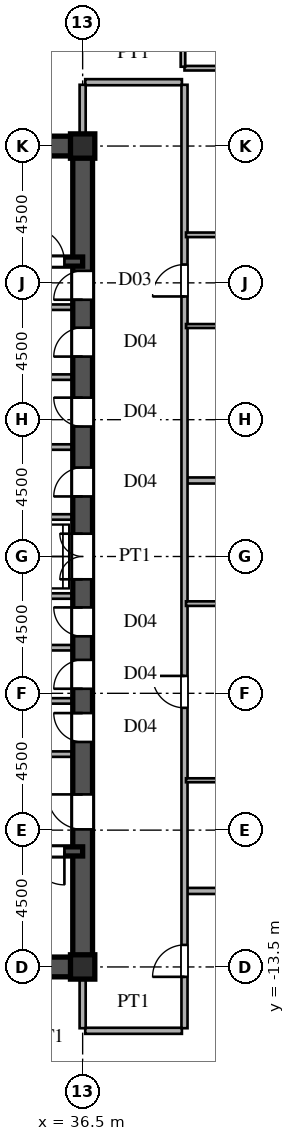
"""IFC4 building model, lengths in metres.
Left out: names, types, materials, properties, quantities, classifications, styles, units other than length and angle.
Written with IfcOpenShell. Run it as: python <this file> out.ifc"""

import sys

from ifc_helpers import new_model, si_unit, direction, frame, frame_2d, origin, origin_2d, place, context, subcontext, project, spatial, rectangle, i_section, extrude, source, transform, mapped, element, fill, save


model = new_model("IFC4")
c1 = context("Model", 3, precision=1e-05, world=origin(), true_north=direction((0.0, 1.0)))
c2 = subcontext(c1, "Body", "Model", "MODEL_VIEW")
j1 = project(units=[si_unit("LENGTHUNIT", "METRE"), si_unit("PLANEANGLEUNIT", "RADIAN")], contexts=[c1])
p1 = place(None, origin())
s1 = spatial("IfcSite", under=j1, at=p1, CompositionType="ELEMENT")
p2 = place(p1, origin())
s2 = spatial("IfcBuilding", under=s1, at=p2, CompositionType="ELEMENT")
p3 = place(p2, frame((0.0, 0.0, 103.2)))
s3 = spatial("IfcBuildingStorey", under=s2, at=p3, CompositionType="ELEMENT", Elevation=103.2)
m1 = source(origin(), c2, "Body", "SweptSolid", [
    extrude(i_section(OverallWidth=0.8, OverallDepth=0.8, WebThickness=0.032, FlangeThickness=0.05, at=origin_2d()), origin(), (0.0, 0.0, 1.0), 3.6),
])
for number, where, z_axis, x_axis in (
    (1, (36.5, -13.5, 0.0), (0.0, 0.0, 1.0), (1.0, 0.0, 0.0)),
    (2, (36.5, 13.5, 0.0), (0.0, 0.0, 1.0), (1.0, 0.0, 0.0)),
):
    element("IfcColumn", number, at=place(p3, frame(where, z_axis=z_axis, x_axis=x_axis)), inside=s3, PredefinedType="COLUMN", context=c2, shape_type="MappedRepresentation", body=[
        mapped(m1, transform((0.0, 0.0, 0.0), scale=1.0)),
    ])
for number, where, z_axis, x_axis in (
    (3, (27.5, -13.5, 0.0), (0.0, 0.0, 1.0), (1.0, 0.0, 0.0)),
    (4, (27.5, 13.5, 0.0), (0.0, 0.0, 1.0), (1.0, 0.0, 0.0)),
):
    element("IfcWall", number, at=place(p3, frame(where, z_axis=z_axis, x_axis=x_axis)), inside=s3, PredefinedType="SHEAR", context=c2, shape_type="SweptSolid", body=[
        extrude(rectangle(XDim=9.0, YDim=0.65, at=frame_2d((4.5, 0.0))), origin(), (0.0, 0.0, 1.0), 3.38),
    ])
p4 = place(p3, frame((36.5, -13.65, 0.0), z_axis=(0.0, 0.0, 1.0), x_axis=(0.0, 1.0, 0.0)))
e5 = element("IfcWall", 5, at=p4, inside=s3, PredefinedType="SHEAR", context=c2, shape_type="SweptSolid", body=[
    extrude(rectangle(XDim=7.15, YDim=0.65, at=frame_2d((3.575, 0.0))), origin(), (0.0, 0.0, 1.0), 3.38),
])
p5 = place(p4, frame((4.675, 0.0, 0.0)))
e6 = element("IfcOpeningElement", 6, at=p5, cuts=e5, PredefinedType="OPENING", context=c2, shape_type="SweptSolid", body=[
    extrude(rectangle(XDim=1.15, YDim=2.2, at=frame_2d((0.575, 1.1))), frame((0.0, 0.335, 0.0), z_axis=(0.0, -1.0, 0.0), x_axis=(1.0, 0.0, 0.0)), (0.0, 0.0, 1.0), 0.67),
])
p6 = place(p3, frame((36.5, -1.3, 0.0), z_axis=(0.0, 0.0, 1.0), x_axis=(0.0, 1.0, 0.0)))
e7 = element("IfcWall", 7, at=p6, inside=s3, PredefinedType="SHEAR", context=c2, shape_type="SweptSolid", body=[
    extrude(rectangle(XDim=2.6, YDim=0.65, at=frame_2d((1.3, 0.0))), origin(), (0.0, 0.0, 1.0), 3.38),
])
p7 = place(p6, frame((0.55, 0.0, 0.0)))
e8 = element("IfcOpeningElement", 8, at=p7, cuts=e7, PredefinedType="OPENING", context=c2, shape_type="SweptSolid", body=[
    extrude(rectangle(XDim=1.5, YDim=2.3, at=frame_2d((0.75, 1.15))), frame((0.0, 0.335, 0.0), z_axis=(0.0, -1.0, 0.0), x_axis=(1.0, 0.0, 0.0)), (0.0, 0.0, 1.0), 0.67),
])
p8 = place(p3, frame((36.5, 8.2, 0.0), z_axis=(0.0, 0.0, 1.0), x_axis=(0.0, 1.0, 0.0)))
e9 = element("IfcWall", 9, at=p8, inside=s3, PredefinedType="SHEAR", context=c2, shape_type="SweptSolid", body=[
    extrude(rectangle(XDim=5.45, YDim=0.65, at=frame_2d((2.725, 0.0))), origin(), (0.0, 0.0, 1.0), 3.38),
])
p9 = place(p8, frame((0.245, 0.0, 0.0)))
e10 = element("IfcOpeningElement", 10, at=p9, cuts=e9, PredefinedType="OPENING", context=c2, shape_type="SweptSolid", body=[
    extrude(rectangle(XDim=0.95, YDim=2.15, at=frame_2d((0.475, 1.075))), frame((0.0, 0.335, 0.0), z_axis=(0.0, -1.0, 0.0), x_axis=(1.0, 0.0, 0.0)), (0.0, 0.0, 1.0), 0.67),
])
p10 = place(p3, frame((36.5, -6.5, 0.0), z_axis=(0.0, 0.0, 1.0), x_axis=(0.0, 1.0, 0.0)))
e11 = element("IfcWall", 11, at=p10, inside=s3, PredefinedType="SHEAR", context=c2, shape_type="SweptSolid", body=[
    extrude(rectangle(XDim=1.75, YDim=0.65, at=frame_2d((0.875, 0.0))), origin(), (0.0, 0.0, 1.0), 3.38),
])
p11 = place(p10, frame((0.4, 0.0, 0.0)))
e12 = element("IfcOpeningElement", 12, at=p11, cuts=e11, PredefinedType="OPENING", context=c2, shape_type="SweptSolid", body=[
    extrude(rectangle(XDim=0.95, YDim=2.15, at=frame_2d((0.475, 1.075))), frame((0.0, 0.335, 0.0), z_axis=(0.0, -1.0, 0.0), x_axis=(1.0, 0.0, 0.0)), (0.0, 0.0, 1.0), 0.67),
])
p12 = place(p3, frame((36.5, -4.75, 0.0), z_axis=(0.0, 0.0, 1.0), x_axis=(0.0, 1.0, 0.0)))
e13 = element("IfcWall", 13, at=p12, inside=s3, PredefinedType="SHEAR", context=c2, shape_type="SweptSolid", body=[
    extrude(rectangle(XDim=1.75, YDim=0.65, at=frame_2d((0.875, 0.0))), origin(), (0.0, 0.0, 1.0), 3.38),
])
p13 = place(p12, frame((0.4, 0.0, 0.0)))
e14 = element("IfcOpeningElement", 14, at=p13, cuts=e13, PredefinedType="OPENING", context=c2, shape_type="SweptSolid", body=[
    extrude(rectangle(XDim=0.95, YDim=2.15, at=frame_2d((0.475, 1.075))), frame((0.0, 0.335, 0.0), z_axis=(0.0, -1.0, 0.0), x_axis=(1.0, 0.0, 0.0)), (0.0, 0.0, 1.0), 0.67),
])
p14 = place(p3, frame((36.5, -3.0, 0.0), z_axis=(0.0, 0.0, 1.0), x_axis=(0.0, 1.0, 0.0)))
e15 = element("IfcWall", 15, at=p14, inside=s3, PredefinedType="SHEAR", context=c2, shape_type="SweptSolid", body=[
    extrude(rectangle(XDim=1.7, YDim=0.65, at=frame_2d((0.85, 0.0))), origin(), (0.0, 0.0, 1.0), 3.38),
])
p15 = place(p14, frame((0.375, 0.0, 0.0)))
e16 = element("IfcOpeningElement", 16, at=p15, cuts=e15, PredefinedType="OPENING", context=c2, shape_type="SweptSolid", body=[
    extrude(rectangle(XDim=0.95, YDim=2.15, at=frame_2d((0.475, 1.075))), frame((0.0, 0.335, 0.0), z_axis=(0.0, -1.0, 0.0), x_axis=(1.0, 0.0, 0.0)), (0.0, 0.0, 1.0), 0.67),
])
p16 = place(p3, frame((36.5, 1.3, 0.0), z_axis=(0.0, 0.0, 1.0), x_axis=(0.0, 1.0, 0.0)))
e17 = element("IfcWall", 17, at=p16, inside=s3, PredefinedType="SHEAR", context=c2, shape_type="SweptSolid", body=[
    extrude(rectangle(XDim=2.3, YDim=0.65, at=frame_2d((1.15, 0.0))), origin(), (0.0, 0.0, 1.0), 3.38),
])
p17 = place(p16, frame((0.675, 0.0, 0.0)))
e18 = element("IfcOpeningElement", 18, at=p17, cuts=e17, PredefinedType="OPENING", context=c2, shape_type="SweptSolid", body=[
    extrude(rectangle(XDim=0.95, YDim=2.15, at=frame_2d((0.475, 1.075))), frame((0.0, 0.335, 0.0), z_axis=(0.0, -1.0, 0.0), x_axis=(1.0, 0.0, 0.0)), (0.0, 0.0, 1.0), 0.67),
])
p18 = place(p3, frame((36.5, 3.6, 0.0), z_axis=(0.0, 0.0, 1.0), x_axis=(0.0, 1.0, 0.0)))
e19 = element("IfcWall", 19, at=p18, inside=s3, PredefinedType="SHEAR", context=c2, shape_type="SweptSolid", body=[
    extrude(rectangle(XDim=2.3, YDim=0.65, at=frame_2d((1.15, 0.0))), origin(), (0.0, 0.0, 1.0), 3.38),
])
p19 = place(p18, frame((0.675, 0.0, 0.0)))
e20 = element("IfcOpeningElement", 20, at=p19, cuts=e19, PredefinedType="OPENING", context=c2, shape_type="SweptSolid", body=[
    extrude(rectangle(XDim=0.95, YDim=2.15, at=frame_2d((0.475, 1.075))), frame((0.0, 0.335, 0.0), z_axis=(0.0, -1.0, 0.0), x_axis=(1.0, 0.0, 0.0)), (0.0, 0.0, 1.0), 0.67),
])
p20 = place(p3, frame((36.5, 5.9, 0.0), z_axis=(0.0, 0.0, 1.0), x_axis=(0.0, 1.0, 0.0)))
e21 = element("IfcWall", 21, at=p20, inside=s3, PredefinedType="SHEAR", context=c2, shape_type="SweptSolid", body=[
    extrude(rectangle(XDim=2.3, YDim=0.65, at=frame_2d((1.15, 0.0))), origin(), (0.0, 0.0, 1.0), 3.38),
])
p21 = place(p20, frame((0.675, 0.0, 0.0)))
e22 = element("IfcOpeningElement", 22, at=p21, cuts=e21, PredefinedType="OPENING", context=c2, shape_type="SweptSolid", body=[
    extrude(rectangle(XDim=0.95, YDim=2.15, at=frame_2d((0.475, 1.075))), frame((0.0, 0.335, 0.0), z_axis=(0.0, -1.0, 0.0), x_axis=(1.0, 0.0, 0.0)), (0.0, 0.0, 1.0), 0.67),
])
p22 = place(p3, frame((27.5, -9.7, 0.0), z_axis=(0.0, 0.0, 1.0), x_axis=(1.0, 0.0, 0.0)))
e23 = element("IfcWall", 23, at=p22, inside=s3, PredefinedType="SHEAR", context=c2, shape_type="SweptSolid", body=[
    extrude(rectangle(XDim=9.0, YDim=0.3, at=frame_2d((4.5, 0.0))), origin(), (0.0, 0.0, 1.0), 3.38),
])
p23 = place(p22, frame((7.3, 0.0, 0.0)))
e24 = element("IfcOpeningElement", 24, at=p23, cuts=e23, PredefinedType="OPENING", context=c2, shape_type="SweptSolid", body=[
    extrude(rectangle(XDim=1.1, YDim=2.2, at=frame_2d((0.55, 1.1))), frame((0.0, 0.16, 0.0), z_axis=(0.0, -1.0, 0.0), x_axis=(1.0, 0.0, 0.0)), (0.0, 0.0, 1.0), 0.32),
])
p24 = place(p3, frame((27.5, 9.7, 0.0), z_axis=(0.0, 0.0, 1.0), x_axis=(1.0, 0.0, 0.0)))
e25 = element("IfcWall", 25, at=p24, inside=s3, PredefinedType="SHEAR", context=c2, shape_type="SweptSolid", body=[
    extrude(rectangle(XDim=9.0, YDim=0.3, at=frame_2d((4.5, 0.0))), origin(), (0.0, 0.0, 1.0), 3.38),
])
p25 = place(p24, frame((7.3, 0.0, 0.0)))
e26 = element("IfcOpeningElement", 26, at=p25, cuts=e25, PredefinedType="OPENING", context=c2, shape_type="SweptSolid", body=[
    extrude(rectangle(XDim=1.1, YDim=2.2, at=frame_2d((0.55, 1.1))), frame((0.0, 0.16, 0.0), z_axis=(0.0, -1.0, 0.0), x_axis=(1.0, 0.0, 0.0)), (0.0, 0.0, 1.0), 0.32),
])
for number, where, z_axis, x_axis in (
    (27, (30.45, -6.5, 0.0), (0.0, 0.0, 1.0), (1.0, 0.0, 0.0)),
    (28, (30.45, 8.2, 0.0), (0.0, 0.0, 1.0), (1.0, 0.0, 0.0)),
):
    element("IfcWall", number, at=place(p3, frame(where, z_axis=z_axis, x_axis=x_axis)), inside=s3, PredefinedType="PARTITIONING", context=c2, shape_type="SweptSolid", body=[
        extrude(rectangle(XDim=5.7, YDim=0.18, at=frame_2d((2.85, 0.0))), origin(), (0.0, 0.0, 1.0), 3.38),
    ])
for number, where, z_axis, x_axis in (
    (29, (33.2, -1.3, 0.0), (0.0, 0.0, 1.0), (1.0, 0.0, 0.0)),
    (30, (33.2, 1.3, 0.0), (0.0, 0.0, 1.0), (1.0, 0.0, 0.0)),
    (31, (33.2, -4.75, 0.0), (0.0, 0.0, 1.0), (1.0, 0.0, 0.0)),
    (32, (33.2, -3.0, 0.0), (0.0, 0.0, 1.0), (1.0, 0.0, 0.0)),
    (33, (33.2, 3.6, 0.0), (0.0, 0.0, 1.0), (1.0, 0.0, 0.0)),
    (34, (33.2, 5.9, 0.0), (0.0, 0.0, 1.0), (1.0, 0.0, 0.0)),
):
    element("IfcWall", number, at=place(p3, frame(where, z_axis=z_axis, x_axis=x_axis)), inside=s3, PredefinedType="PARTITIONING", context=c2, shape_type="SweptSolid", body=[
        extrude(rectangle(XDim=2.95, YDim=0.18, at=frame_2d((1.475, 0.0))), origin(), (0.0, 0.0, 1.0), 3.38),
    ])
p26 = place(p3, frame((36.585, -15.6, 0.0), z_axis=(0.0, 0.0, 1.0), x_axis=(1.0, 0.0, 0.0)))
e35 = element("IfcWall", 35, at=p26, inside=s3, PredefinedType="PARTITIONING", context=c2, shape_type="SweptSolid", body=[
    extrude(rectangle(XDim=3.18, YDim=0.2, at=frame_2d((1.59, 0.0))), origin(), (0.0, 0.0, 1.0), 3.38),
])
p27 = place(p3, frame((39.93, -11.0, 0.0), z_axis=(0.0, 0.0, 1.0), x_axis=(1.0, 0.0, 0.0)))
e36 = element("IfcWall", 36, at=p27, inside=s3, PredefinedType="PARTITIONING", context=c2, shape_type="SweptSolid", body=[
    extrude(rectangle(XDim=23.304, YDim=0.2, at=frame_2d((11.652, 0.0))), origin(), (0.0, 0.0, 1.0), 3.38),
])
p28 = place(p3, frame((39.9, -7.36, 0.0), z_axis=(0.0, 0.0, 1.0), x_axis=(1.0, 0.0, 0.0)))
e37 = element("IfcWall", 37, at=p28, inside=s3, PredefinedType="PARTITIONING", context=c2, shape_type="SweptSolid", body=[
    extrude(rectangle(XDim=5.55, YDim=0.13, at=frame_2d((2.775, 0.0))), origin(), (0.0, 0.0, 1.0), 3.38),
])
p29 = place(p28, frame((2.335, 0.0, 0.0)))
e38 = element("IfcOpeningElement", 38, at=p29, cuts=e37, PredefinedType="OPENING", context=c2, shape_type="SweptSolid", body=[
    extrude(rectangle(XDim=0.88, YDim=2.1, at=frame_2d((0.44, 1.05))), frame((0.0, 0.075, 0.0), z_axis=(0.0, -1.0, 0.0), x_axis=(1.0, 0.0, 0.0)), (0.0, 0.0, 1.0), 0.15),
])
p30 = place(p3, frame((39.9, -1.55, 0.0), z_axis=(0.0, 0.0, 1.0), x_axis=(1.0, 0.0, 0.0)))
e39 = element("IfcWall", 39, at=p30, inside=s3, PredefinedType="PARTITIONING", context=c2, shape_type="SweptSolid", body=[
    extrude(rectangle(XDim=5.55, YDim=0.15, at=frame_2d((2.775, 0.0))), origin(), (0.0, 0.0, 1.0), 3.38),
])
p31 = place(p30, frame((2.3, 0.0, 0.0)))
e40 = element("IfcOpeningElement", 40, at=p31, cuts=e39, PredefinedType="OPENING", context=c2, shape_type="SweptSolid", body=[
    extrude(rectangle(XDim=0.95, YDim=2.15, at=frame_2d((0.475, 1.075))), frame((0.0, 0.085, 0.0), z_axis=(0.0, -1.0, 0.0), x_axis=(1.0, 0.0, 0.0)), (0.0, 0.0, 1.0), 0.17),
])
p32 = place(p3, frame((39.93, 2.5, 0.0), z_axis=(0.0, 0.0, 1.0), x_axis=(1.0, 0.0, 0.0)))
e41 = element("IfcWall", 41, at=p32, inside=s3, PredefinedType="PARTITIONING", context=c2, shape_type="SweptSolid", body=[
    extrude(rectangle(XDim=31.075, YDim=0.2, at=frame_2d((15.538, 0.0))), origin(), (0.0, 0.0, 1.0), 3.38),
])
p33 = place(p3, frame((39.9, 7.58, 0.0), z_axis=(0.0, 0.0, 1.0), x_axis=(1.0, 0.0, 0.0)))
e42 = element("IfcWall", 42, at=p33, inside=s3, PredefinedType="PARTITIONING", context=c2, shape_type="SweptSolid", body=[
    extrude(rectangle(XDim=5.55, YDim=0.13, at=frame_2d((2.775, 0.0))), origin(), (0.0, 0.0, 1.0), 3.38),
])
p34 = place(p33, frame((2.335, 0.0, 0.0)))
e43 = element("IfcOpeningElement", 43, at=p34, cuts=e42, PredefinedType="OPENING", context=c2, shape_type="SweptSolid", body=[
    extrude(rectangle(XDim=0.88, YDim=2.1, at=frame_2d((0.44, 1.05))), frame((0.0, 0.075, 0.0), z_axis=(0.0, -1.0, 0.0), x_axis=(1.0, 0.0, 0.0)), (0.0, 0.0, 1.0), 0.15),
])
p35 = place(p3, frame((39.9, 10.58, 0.0), z_axis=(0.0, 0.0, 1.0), x_axis=(1.0, 0.0, 0.0)))
e44 = element("IfcWall", 44, at=p35, inside=s3, PredefinedType="PARTITIONING", context=c2, shape_type="SweptSolid", body=[
    extrude(rectangle(XDim=5.55, YDim=0.15, at=frame_2d((2.775, 0.0))), origin(), (0.0, 0.0, 1.0), 3.38),
])
p36 = place(p35, frame((2.3, 0.0, 0.0)))
e45 = element("IfcOpeningElement", 45, at=p36, cuts=e44, PredefinedType="OPENING", context=c2, shape_type="SweptSolid", body=[
    extrude(rectangle(XDim=0.95, YDim=2.15, at=frame_2d((0.475, 1.075))), frame((0.0, 0.085, 0.0), z_axis=(0.0, -1.0, 0.0), x_axis=(1.0, 0.0, 0.0)), (0.0, 0.0, 1.0), 0.17),
])
p37 = place(p3, frame((36.585, 15.6, 0.0), z_axis=(0.0, 0.0, 1.0), x_axis=(1.0, 0.0, 0.0)))
e46 = element("IfcWall", 46, at=p37, inside=s3, PredefinedType="PARTITIONING", context=c2, shape_type="SweptSolid", body=[
    extrude(rectangle(XDim=3.18, YDim=0.2, at=frame_2d((1.59, 0.0))), origin(), (0.0, 0.0, 1.0), 3.38),
])
p38 = place(p3, frame((39.85, 16.06, 0.0), z_axis=(0.0, 0.0, 1.0), x_axis=(1.0, 0.0, 0.0)))
e47 = element("IfcWall", 47, at=p38, inside=s3, PredefinedType="PARTITIONING", context=c2, shape_type="SweptSolid", body=[
    extrude(rectangle(XDim=5.6, YDim=0.15, at=frame_2d((2.8, 0.0))), origin(), (0.0, 0.0, 1.0), 3.38),
])
p39 = place(p38, frame((2.325, 0.0, 0.0)))
e48 = element("IfcOpeningElement", 48, at=p39, cuts=e47, PredefinedType="OPENING", context=c2, shape_type="SweptSolid", body=[
    extrude(rectangle(XDim=0.95, YDim=2.15, at=frame_2d((0.475, 1.075))), frame((0.0, 0.085, 0.0), z_axis=(0.0, -1.0, 0.0), x_axis=(1.0, 0.0, 0.0)), (0.0, 0.0, 1.0), 0.17),
])
for number, where, z_axis, x_axis in (
    (49, (36.5, -15.515, 0.0), (0.0, 0.0, 1.0), (0.0, 1.0, 0.0)),
    (50, (36.5, 13.83, 0.0), (0.0, 0.0, 1.0), (0.0, 1.0, 0.0)),
):
    element("IfcWall", number, at=place(p3, frame(where, z_axis=z_axis, x_axis=x_axis)), inside=s3, PredefinedType="PARTITIONING", context=c2, shape_type="SweptSolid", body=[
        extrude(rectangle(XDim=1.685, YDim=0.2, at=frame_2d((0.842, 0.0))), origin(), (0.0, 0.0, 1.0), 2.68),
    ])
p40 = place(p3, frame((39.8, 16.109, 0.0), z_axis=(0.0, 0.0, 1.0), x_axis=(0.0, 1.0, 0.0)))
e51 = element("IfcWall", 51, at=p40, inside=s3, PredefinedType="PARTITIONING", context=c2, shape_type="SweptSolid", body=[
    extrude(rectangle(XDim=5.466, YDim=0.15, at=frame_2d((2.733, 0.0))), origin(), (0.0, 0.0, 1.0), 3.38),
])
p41 = place(p40, frame((1.195, 0.0, 0.0)))
e52 = element("IfcOpeningElement", 52, at=p41, cuts=e51, PredefinedType="OPENING", context=c2, shape_type="SweptSolid", body=[
    extrude(rectangle(XDim=0.95, YDim=2.15, at=frame_2d((0.475, 1.075))), frame((0.0, 0.085, 0.0), z_axis=(0.0, -1.0, 0.0), x_axis=(1.0, 0.0, 0.0)), (0.0, 0.0, 1.0), 0.17),
])
p42 = place(p3, frame((39.85, -15.515, 0.0), z_axis=(0.0, 0.0, 1.0), x_axis=(0.0, 1.0, 0.0)))
e53 = element("IfcWall", 53, at=p42, inside=s3, PredefinedType="PARTITIONING", context=c2, shape_type="SweptSolid", body=[
    extrude(rectangle(XDim=31.03, YDim=0.2, at=frame_2d((15.515, 0.0))), origin(), (0.0, 0.0, 1.0), 3.38),
])
p43 = place(p42, frame((1.69, 0.0, 0.0)))
e54 = element("IfcOpeningElement", 54, at=p43, cuts=e53, PredefinedType="OPENING", context=c2, shape_type="SweptSolid", body=[
    extrude(rectangle(XDim=1.05, YDim=2.25, at=frame_2d((0.525, 1.125))), frame((0.0, 0.11, 0.0), z_axis=(0.0, -1.0, 0.0), x_axis=(1.0, 0.0, 0.0)), (0.0, 0.0, 1.0), 0.22),
])
p44 = place(p42, frame((10.538, 0.0, 0.0)))
e55 = element("IfcOpeningElement", 55, at=p44, cuts=e53, PredefinedType="OPENING", context=c2, shape_type="SweptSolid", body=[
    extrude(rectangle(XDim=1.05, YDim=2.25, at=frame_2d((0.525, 1.125))), frame((0.0, 0.11, 0.0), z_axis=(0.0, -1.0, 0.0), x_axis=(1.0, 0.0, 0.0)), (0.0, 0.0, 1.0), 0.22),
])
p45 = place(p42, frame((24.067, 0.0, 0.0)))
e56 = element("IfcOpeningElement", 56, at=p45, cuts=e53, PredefinedType="OPENING", context=c2, shape_type="SweptSolid", body=[
    extrude(rectangle(XDim=1.05, YDim=2.25, at=frame_2d((0.525, 1.125))), frame((0.0, 0.11, 0.0), z_axis=(0.0, -1.0, 0.0), x_axis=(1.0, 0.0, 0.0)), (0.0, 0.0, 1.0), 0.22),
])
m2 = source(origin(), c2, "Body", "SweptSolid", [
    extrude(rectangle(XDim=1.15, YDim=2.2, at=frame_2d((0.575, 1.1))), frame((0.0, 0.025, 0.0), z_axis=(0.0, -1.0, 0.0), x_axis=(1.0, 0.0, 0.0)), (0.0, 0.0, 1.0), 0.05),
])
p46 = place(p5, origin())
e57 = element("IfcDoor", 57, at=p46, inside=s3, OperationType="SINGLE_SWING_RIGHT", PredefinedType="DOOR", context=c2, shape_type="MappedRepresentation", body=[
    mapped(m2, transform((0.0, 0.0, 0.0), scale=1.0)),
])
fill(e6, e57)
m3 = source(origin(), c2, "Body", "SweptSolid", [
    extrude(rectangle(XDim=1.5, YDim=2.3, at=frame_2d((0.75, 1.15))), frame((0.0, 0.025, 0.0), z_axis=(0.0, -1.0, 0.0), x_axis=(1.0, 0.0, 0.0)), (0.0, 0.0, 1.0), 0.05),
])
p47 = place(p7, origin())
e58 = element("IfcDoor", 58, at=p47, inside=s3, OperationType="DOUBLE_SWING_LEFT", PredefinedType="DOOR", context=c2, shape_type="MappedRepresentation", body=[
    mapped(m3, transform((0.0, 0.0, 0.0), scale=1.0)),
])
fill(e8, e58)
m4 = source(origin(), c2, "Body", "SweptSolid", [
    extrude(rectangle(XDim=0.95, YDim=2.15, at=frame_2d((0.475, 1.075))), frame((0.0, 0.025, 0.0), z_axis=(0.0, -1.0, 0.0), x_axis=(1.0, 0.0, 0.0)), (0.0, 0.0, 1.0), 0.05),
])
p48 = place(p9, origin())
e59 = element("IfcDoor", 59, at=p48, inside=s3, OperationType="SINGLE_SWING_LEFT", PredefinedType="DOOR", context=c2, shape_type="MappedRepresentation", body=[
    mapped(m4, transform((0.0, 0.0, 0.0), scale=1.0)),
])
fill(e10, e59)
p49 = place(p11, origin())
e60 = element("IfcDoor", 60, at=p49, inside=s3, OperationType="SINGLE_SWING_RIGHT", PredefinedType="DOOR", context=c2, shape_type="MappedRepresentation", body=[
    mapped(m4, transform((0.0, 0.0, 0.0), scale=1.0)),
])
fill(e12, e60)
p50 = place(p13, origin())
e61 = element("IfcDoor", 61, at=p50, inside=s3, OperationType="SINGLE_SWING_LEFT", PredefinedType="DOOR", context=c2, shape_type="MappedRepresentation", body=[
    mapped(m4, transform((0.0, 0.0, 0.0), scale=1.0)),
])
fill(e14, e61)
p51 = place(p15, origin())
e62 = element("IfcDoor", 62, at=p51, inside=s3, OperationType="SINGLE_SWING_RIGHT", PredefinedType="DOOR", context=c2, shape_type="MappedRepresentation", body=[
    mapped(m4, transform((0.0, 0.0, 0.0), scale=1.0)),
])
fill(e16, e62)
p52 = place(p17, origin())
e63 = element("IfcDoor", 63, at=p52, inside=s3, OperationType="SINGLE_SWING_LEFT", PredefinedType="DOOR", context=c2, shape_type="MappedRepresentation", body=[
    mapped(m4, transform((0.0, 0.0, 0.0), scale=1.0)),
])
fill(e18, e63)
p53 = place(p19, origin())
e64 = element("IfcDoor", 64, at=p53, inside=s3, OperationType="SINGLE_SWING_RIGHT", PredefinedType="DOOR", context=c2, shape_type="MappedRepresentation", body=[
    mapped(m4, transform((0.0, 0.0, 0.0), scale=1.0)),
])
fill(e20, e64)
p54 = place(p21, origin())
e65 = element("IfcDoor", 65, at=p54, inside=s3, OperationType="SINGLE_SWING_LEFT", PredefinedType="DOOR", context=c2, shape_type="MappedRepresentation", body=[
    mapped(m4, transform((0.0, 0.0, 0.0), scale=1.0)),
])
fill(e22, e65)
m5 = source(origin(), c2, "Body", "SweptSolid", [
    extrude(rectangle(XDim=1.1, YDim=2.2, at=frame_2d((0.55, 1.1))), frame((0.0, 0.025, 0.0), z_axis=(0.0, -1.0, 0.0), x_axis=(1.0, 0.0, 0.0)), (0.0, 0.0, 1.0), 0.05),
])
p55 = place(p23, frame((1.1, 0.0, 0.0), z_axis=(0.0, 0.0, 1.0), x_axis=(-1.0, 0.0, 0.0)))
e66 = element("IfcDoor", 66, at=p55, inside=s3, OperationType="SINGLE_SWING_RIGHT", PredefinedType="DOOR", context=c2, shape_type="MappedRepresentation", body=[
    mapped(m5, transform((0.0, 0.0, 0.0), scale=1.0)),
])
fill(e24, e66)
p56 = place(p25, origin())
e67 = element("IfcDoor", 67, at=p56, inside=s3, OperationType="SINGLE_SWING_LEFT", PredefinedType="DOOR", context=c2, shape_type="MappedRepresentation", body=[
    mapped(m5, transform((0.0, 0.0, 0.0), scale=1.0)),
])
fill(e26, e67)
m6 = source(origin(), c2, "Body", "SweptSolid", [
    extrude(rectangle(XDim=1.05, YDim=2.25, at=frame_2d((0.525, 1.125))), frame((0.0, 0.025, 0.0), z_axis=(0.0, -1.0, 0.0), x_axis=(1.0, 0.0, 0.0)), (0.0, 0.0, 1.0), 0.05),
])
p57 = place(p43, origin())
e68 = element("IfcDoor", 68, at=p57, inside=s3, OperationType="SINGLE_SWING_LEFT", PredefinedType="DOOR", context=c2, shape_type="MappedRepresentation", body=[
    mapped(m6, transform((0.0, 0.0, 0.0), scale=1.0)),
])
fill(e54, e68)
p58 = place(p44, origin())
e69 = element("IfcDoor", 69, at=p58, inside=s3, OperationType="SINGLE_SWING_RIGHT", PredefinedType="DOOR", context=c2, shape_type="MappedRepresentation", body=[
    mapped(m6, transform((0.0, 0.0, 0.0), scale=1.0)),
])
fill(e55, e69)
p59 = place(p45, origin())
e70 = element("IfcDoor", 70, at=p59, inside=s3, OperationType="SINGLE_SWING_LEFT", PredefinedType="DOOR", context=c2, shape_type="MappedRepresentation", body=[
    mapped(m6, transform((0.0, 0.0, 0.0), scale=1.0)),
])
fill(e56, e70)
save(model, sys.argv[1])
